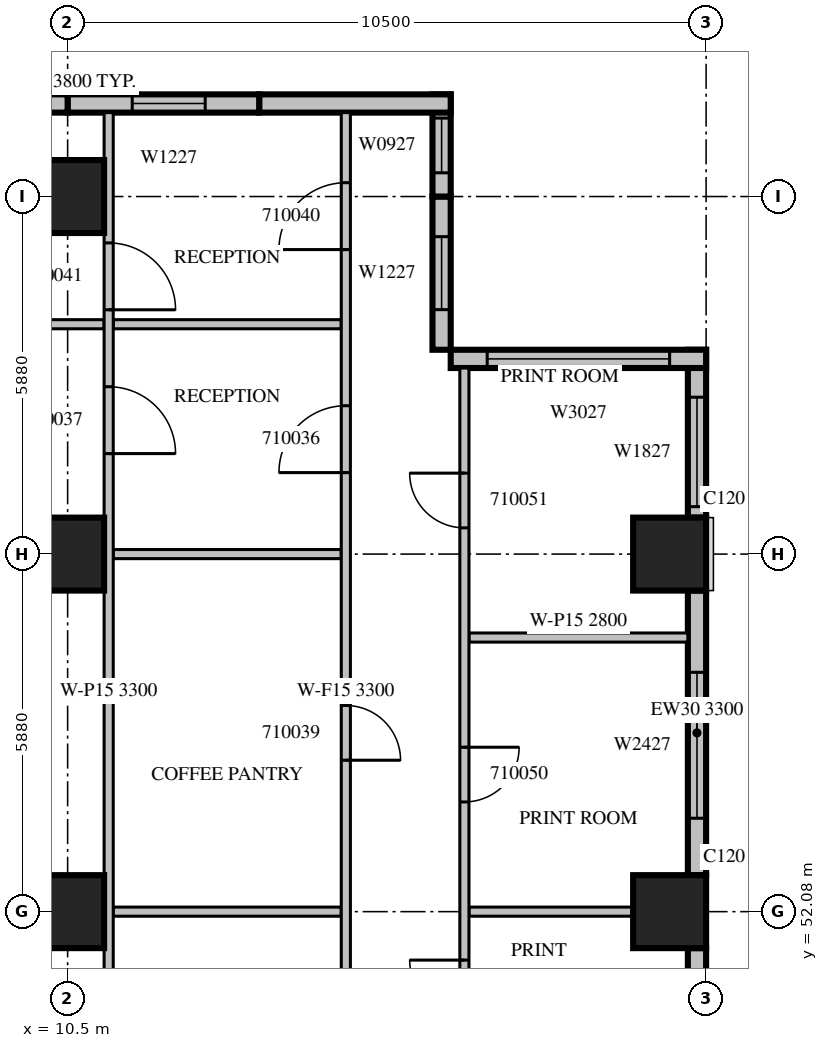
"""IFC4 building model, lengths in metres.
Left out: names, types, materials, properties, quantities, classifications, styles, units other than length and angle.
Written with IfcOpenShell. Run it as: python <this file> out.ifc"""

import sys

from ifc_helpers import new_model, si_unit, direction, frame, frame_2d, origin, origin_2d, place, context, subcontext, project, spatial, rectangle, extrude, source, transform, mapped, element, fill, save


model = new_model("IFC4")
c1 = context("Model", 3, precision=1e-05, world=origin(), true_north=direction((0.0, 1.0)))
c2 = subcontext(c1, "Body", "Model", "MODEL_VIEW")
j1 = project(units=[si_unit("LENGTHUNIT", "METRE"), si_unit("PLANEANGLEUNIT", "RADIAN")], contexts=[c1])
p1 = place(None, origin())
s1 = spatial("IfcSite", under=j1, at=p1, CompositionType="ELEMENT")
p2 = place(p1, origin())
s2 = spatial("IfcBuilding", under=s1, at=p2, CompositionType="ELEMENT")
p3 = place(p2, frame((0.0, 0.0, 53.1)))
s3 = spatial("IfcBuildingStorey", under=s2, at=p3, CompositionType="ELEMENT", Elevation=53.1)
m1 = source(origin(), c2, "Body", "SweptSolid", [
    extrude(rectangle(XDim=1.2, YDim=1.2, at=origin_2d()), origin(), (0.0, 0.0, 1.0), 4.2),
])
for number, where, z_axis, x_axis in (
    (1, (10.5, 52.08, 0.0), (0.0, 0.0, 1.0), (1.0, 0.0, 0.0)),
    (2, (20.4, 52.08, 0.0), (0.0, 0.0, 1.0), (1.0, 0.0, 0.0)),
    (3, (10.5, 57.96, 0.0), (0.0, 0.0, 1.0), (1.0, 0.0, 0.0)),
    (4, (20.4, 57.96, 0.0), (0.0, 0.0, 1.0), (1.0, 0.0, 0.0)),
    (5, (10.5, 63.84, 0.0), (0.0, 0.0, 1.0), (1.0, 0.0, 0.0)),
):
    element("IfcColumn", number, at=place(p3, frame(where, z_axis=z_axis, x_axis=x_axis)), inside=s3, PredefinedType="COLUMN", context=c2, shape_type="MappedRepresentation", body=[
        mapped(m1, transform((0.0, 0.0, 0.0), scale=1.0)),
    ])
m2 = source(origin(), c2, "Body", "SweptSolid", [
    extrude(rectangle(XDim=4.68, YDim=0.3, at=frame_2d((2.34, 0.0))), origin(), (0.0, 0.0, 1.0), 3.8),
])
p4 = place(p3, frame((20.85, 46.8, 0.0), z_axis=(0.0, 0.0, 1.0), x_axis=(0.0, 1.0, 0.0)))
e6 = element("IfcWall", 6, at=p4, inside=s3, PredefinedType="STANDARD", context=c2, shape_type="MappedRepresentation", body=[
    mapped(m2, transform((0.0, 0.0, 0.0), scale=1.0)),
])
m3 = source(origin(), c2, "Body", "SweptSolid", [
    extrude(rectangle(XDim=1.2, YDim=2.7, at=frame_2d((0.6, 1.35))), frame((0.0, 0.16, 0.0), z_axis=(0.0, -1.0, 0.0), x_axis=(1.0, 0.0, 0.0)), (0.0, 0.0, 1.0), 0.32),
])
p5 = place(p4, frame((0.976, 0.0, 0.6)))
e7 = element("IfcOpeningElement", 7, at=p5, cuts=e6, PredefinedType="OPENING", context=c2, shape_type="MappedRepresentation", body=[
    mapped(m3, transform((0.0, 0.0, 0.0), scale=1.0)),
])
m4 = source(origin(), c2, "Body", "SweptSolid", [
    extrude(rectangle(XDim=4.68, YDim=0.3, at=frame_2d((2.34, 0.0))), origin(), (0.0, 0.0, 1.0), 3.3),
])
p6 = place(p3, frame((20.85, 52.68, 0.0), z_axis=(0.0, 0.0, 1.0), x_axis=(0.0, 1.0, 0.0)))
e8 = element("IfcWall", 8, at=p6, inside=s3, PredefinedType="STANDARD", context=c2, shape_type="MappedRepresentation", body=[
    mapped(m4, transform((0.0, 0.0, 0.0), scale=1.0)),
])
m5 = source(origin(), c2, "Body", "SweptSolid", [
    extrude(rectangle(XDim=2.4, YDim=2.7, at=frame_2d((1.2, 1.35))), frame((0.0, 0.16, 0.0), z_axis=(0.0, -1.0, 0.0), x_axis=(1.0, 0.0, 0.0)), (0.0, 0.0, 1.0), 0.32),
])
p7 = place(p6, frame((0.936, 0.0, 0.6)))
e9 = element("IfcOpeningElement", 9, at=p7, cuts=e8, PredefinedType="OPENING", context=c2, shape_type="MappedRepresentation", body=[
    mapped(m5, transform((0.0, 0.0, 0.0), scale=1.0)),
])
m6 = source(origin(), c2, "Body", "SweptSolid", [
    extrude(rectangle(XDim=2.76, YDim=0.3, at=frame_2d((1.38, 0.0))), origin(), (0.0, 0.0, 1.0), 3.8),
])
p8 = place(p3, frame((20.85, 58.56, 0.0), z_axis=(0.0, 0.0, 1.0), x_axis=(0.0, 1.0, 0.0)))
e10 = element("IfcWall", 10, at=p8, inside=s3, PredefinedType="STANDARD", context=c2, shape_type="MappedRepresentation", body=[
    mapped(m6, transform((0.0, 0.0, 0.0), scale=1.0)),
])
m7 = source(origin(), c2, "Body", "SweptSolid", [
    extrude(rectangle(XDim=1.8, YDim=2.7, at=frame_2d((0.9, 1.35))), frame((0.0, 0.16, 0.0), z_axis=(0.0, -1.0, 0.0), x_axis=(1.0, 0.0, 0.0)), (0.0, 0.0, 1.0), 0.32),
])
p9 = place(p8, frame((0.18, 0.0, 0.6)))
e11 = element("IfcOpeningElement", 11, at=p9, cuts=e10, PredefinedType="OPENING", context=c2, shape_type="MappedRepresentation", body=[
    mapped(m7, transform((0.0, 0.0, 0.0), scale=1.0)),
])
m8 = source(origin(), c2, "Body", "SweptSolid", [
    extrude(rectangle(XDim=4.2, YDim=0.3, at=frame_2d((2.1, 0.0))), origin(), (0.0, 0.0, 1.0), 3.8),
])
p10 = place(p3, frame((21.0, 61.17, 0.0), z_axis=(0.0, 0.0, 1.0), x_axis=(-1.0, 0.0, 0.0)))
e12 = element("IfcWall", 12, at=p10, inside=s3, PredefinedType="STANDARD", context=c2, shape_type="MappedRepresentation", body=[
    mapped(m8, transform((0.0, 0.0, 0.0), scale=1.0)),
])
m9 = source(origin(), c2, "Body", "SweptSolid", [
    extrude(rectangle(XDim=3.0, YDim=2.7, at=frame_2d((1.5, 1.35))), frame((0.0, 0.16, 0.0), z_axis=(0.0, -1.0, 0.0), x_axis=(1.0, 0.0, 0.0)), (0.0, 0.0, 1.0), 0.32),
])
p11 = place(p10, frame((0.6, 0.0, 0.6)))
e13 = element("IfcOpeningElement", 13, at=p11, cuts=e12, PredefinedType="OPENING", context=c2, shape_type="MappedRepresentation", body=[
    mapped(m9, transform((0.0, 0.0, 0.0), scale=1.0)),
])
m10 = source(origin(), c2, "Body", "SweptSolid", [
    extrude(rectangle(XDim=2.52, YDim=0.3, at=frame_2d((1.26, 0.0))), origin(), (0.0, 0.0, 1.0), 3.8),
])
p12 = place(p3, frame((16.65, 61.32, 0.0), z_axis=(0.0, 0.0, 1.0), x_axis=(0.0, 1.0, 0.0)))
e14 = element("IfcWall", 14, at=p12, inside=s3, PredefinedType="STANDARD", context=c2, shape_type="MappedRepresentation", body=[
    mapped(m10, transform((0.0, 0.0, 0.0), scale=1.0)),
])
p13 = place(p12, frame((0.66, 0.0, 0.6)))
e15 = element("IfcOpeningElement", 15, at=p13, cuts=e14, PredefinedType="OPENING", context=c2, shape_type="MappedRepresentation", body=[
    mapped(m3, transform((0.0, 0.0, 0.0), scale=1.0)),
])
m11 = source(origin(), c2, "Body", "SweptSolid", [
    extrude(rectangle(XDim=1.68, YDim=0.3, at=frame_2d((0.84, 0.0))), origin(), (0.0, 0.0, 1.0), 3.8),
])
p14 = place(p3, frame((16.65, 63.84, 0.0), z_axis=(0.0, 0.0, 1.0), x_axis=(0.0, 1.0, 0.0)))
e16 = element("IfcWall", 16, at=p14, inside=s3, PredefinedType="STANDARD", context=c2, shape_type="MappedRepresentation", body=[
    mapped(m11, transform((0.0, 0.0, 0.0), scale=1.0)),
])
m12 = source(origin(), c2, "Body", "SweptSolid", [
    extrude(rectangle(XDim=0.9, YDim=2.7, at=frame_2d((0.45, 1.35))), frame((0.0, 0.16, 0.0), z_axis=(0.0, -1.0, 0.0), x_axis=(1.0, 0.0, 0.0)), (0.0, 0.0, 1.0), 0.32),
])
p15 = place(p14, frame((0.39, 0.0, 0.6)))
e17 = element("IfcOpeningElement", 17, at=p15, cuts=e16, PredefinedType="OPENING", context=c2, shape_type="MappedRepresentation", body=[
    mapped(m12, transform((0.0, 0.0, 0.0), scale=1.0)),
])
m13 = source(origin(), c2, "Body", "SweptSolid", [
    extrude(rectangle(XDim=3.15, YDim=0.3, at=frame_2d((1.575, 0.0))), origin(), (0.0, 0.0, 1.0), 3.8),
])
p16 = place(p3, frame((16.8, 65.37, 0.0), z_axis=(0.0, 0.0, 1.0), x_axis=(-1.0, 0.0, 0.0)))
e18 = element("IfcWall", 18, at=p16, inside=s3, PredefinedType="STANDARD", context=c2, shape_type="MappedRepresentation", body=[
    mapped(m13, transform((0.0, 0.0, 0.0), scale=1.0)),
])
p17 = place(p3, frame((13.65, 65.37, 0.0), z_axis=(0.0, 0.0, 1.0), x_axis=(-1.0, 0.0, 0.0)))
e19 = element("IfcWall", 19, at=p17, inside=s3, PredefinedType="STANDARD", context=c2, shape_type="MappedRepresentation", body=[
    mapped(m13, transform((0.0, 0.0, 0.0), scale=1.0)),
])
p18 = place(p17, frame((0.887, 0.0, 0.6)))
e20 = element("IfcOpeningElement", 20, at=p18, cuts=e19, PredefinedType="OPENING", context=c2, shape_type="MappedRepresentation", body=[
    mapped(m3, transform((0.0, 0.0, 0.0), scale=1.0)),
])
m14 = source(origin(), c2, "Body", "SweptSolid", [
    extrude(rectangle(XDim=6.3, YDim=0.3, at=frame_2d((3.15, 0.0))), origin(), (0.0, 0.0, 1.0), 3.8),
])
p19 = place(p3, frame((10.5, 65.37, 0.0), z_axis=(0.0, 0.0, 1.0), x_axis=(-1.0, 0.0, 0.0)))
e21 = element("IfcWall", 21, at=p19, inside=s3, PredefinedType="STANDARD", context=c2, shape_type="MappedRepresentation", body=[
    mapped(m14, transform((0.0, 0.0, 0.0), scale=1.0)),
])
p20 = place(p19, frame((0.675, 0.0, 0.6)))
e22 = element("IfcOpeningElement", 22, at=p20, cuts=e21, PredefinedType="OPENING", context=c2, shape_type="MappedRepresentation", body=[
    mapped(m7, transform((0.0, 0.0, 0.0), scale=1.0)),
])
p21 = place(p19, frame((3.825, 0.0, 0.6)))
e23 = element("IfcOpeningElement", 23, at=p21, cuts=e21, PredefinedType="OPENING", context=c2, shape_type="MappedRepresentation", body=[
    mapped(m7, transform((0.0, 0.0, 0.0), scale=1.0)),
])
m15 = source(origin(), c2, "Body", "SweptSolid", [
    extrude(rectangle(XDim=3.75, YDim=0.15, at=frame_2d((1.875, 0.0))), origin(), (0.0, 0.0, 1.0), 3.8),
])
for number, where, z_axis, x_axis in (
    (24, (15.0, 52.08, 0.0), (0.0, 0.0, 1.0), (-1.0, 0.0, 0.0)),
    (25, (15.0, 57.96, 0.0), (0.0, 0.0, 1.0), (-1.0, 0.0, 0.0)),
):
    element("IfcWall", number, at=place(p3, frame(where, z_axis=z_axis, x_axis=x_axis)), inside=s3, PredefinedType="PARTITIONING", context=c2, shape_type="MappedRepresentation", body=[
        mapped(m15, transform((0.0, 0.0, 0.0), scale=1.0)),
    ])
m16 = source(origin(), c2, "Body", "SweptSolid", [
    extrude(rectangle(XDim=6.695, YDim=0.15, at=frame_2d((3.348, 0.0))), origin(), (0.0, 0.0, 1.0), 3.8),
])
p22 = place(p3, frame((11.1, 61.74, 0.0), z_axis=(0.0, 0.0, 1.0), x_axis=(-1.0, 0.0, 0.0)))
e26 = element("IfcWall", 26, at=p22, inside=s3, PredefinedType="PARTITIONING", context=c2, shape_type="MappedRepresentation", body=[
    mapped(m16, transform((0.0, 0.0, 0.0), scale=1.0)),
])
p23 = place(p3, frame((15.0, 61.74, 0.0), z_axis=(0.0, 0.0, 1.0), x_axis=(-1.0, 0.0, 0.0)))
e27 = element("IfcWall", 27, at=p23, inside=s3, PredefinedType="PARTITIONING", context=c2, shape_type="MappedRepresentation", body=[
    mapped(m15, transform((0.0, 0.0, 0.0), scale=1.0)),
])
m17 = source(origin(), c2, "Body", "SweptSolid", [
    extrude(rectangle(XDim=19.02, YDim=0.15, at=frame_2d((9.51, 0.0))), origin(), (0.0, 0.0, 1.0), 3.3),
])
p24 = place(p3, frame((11.175, 46.2, 0.0), z_axis=(0.0, 0.0, 1.0), x_axis=(0.0, 1.0, 0.0)))
e28 = element("IfcWall", 28, at=p24, inside=s3, PredefinedType="PARTITIONING", context=c2, shape_type="MappedRepresentation", body=[
    mapped(m17, transform((0.0, 0.0, 0.0), scale=1.0)),
])
m18 = source(origin(), c2, "Body", "SweptSolid", [
    extrude(rectangle(XDim=1.1, YDim=2.1, at=frame_2d((0.55, 1.05))), frame((0.0, 0.085, 0.0), z_axis=(0.0, -1.0, 0.0), x_axis=(1.0, 0.0, 0.0)), (0.0, 0.0, 1.0), 0.17),
])
p25 = place(p24, frame((13.412, 0.0, 0.0)))
e29 = element("IfcOpeningElement", 29, at=p25, cuts=e28, PredefinedType="OPENING", context=c2, shape_type="MappedRepresentation", body=[
    mapped(m18, transform((0.0, 0.0, 0.0), scale=1.0)),
])
p26 = place(p24, frame((15.777, 0.0, 0.0)))
e30 = element("IfcOpeningElement", 30, at=p26, cuts=e28, PredefinedType="OPENING", context=c2, shape_type="MappedRepresentation", body=[
    mapped(m18, transform((0.0, 0.0, 0.0), scale=1.0)),
])
m19 = source(origin(), c2, "Body", "SweptSolid", [
    extrude(rectangle(XDim=3.6, YDim=0.15, at=frame_2d((1.8, 0.0))), origin(), (0.0, 0.0, 1.0), 2.8),
])
p27 = place(p3, frame((17.1, 56.587, 0.0), z_axis=(0.0, 0.0, 1.0), x_axis=(1.0, 0.0, 0.0)))
e31 = element("IfcWall", 31, at=p27, inside=s3, PredefinedType="PARTITIONING", context=c2, shape_type="MappedRepresentation", body=[
    mapped(m19, transform((0.0, 0.0, 0.0), scale=1.0)),
])
m20 = source(origin(), c2, "Body", "SweptSolid", [
    extrude(rectangle(XDim=2.701, YDim=0.15, at=frame_2d((1.351, 0.0))), origin(), (0.0, 0.0, 1.0), 3.8),
])
p28 = place(p3, frame((19.801, 52.08, 0.0), z_axis=(0.0, 0.0, 1.0), x_axis=(-1.0, 0.0, 0.0)))
e32 = element("IfcWall", 32, at=p28, inside=s3, PredefinedType="PARTITIONING", context=c2, shape_type="MappedRepresentation", body=[
    mapped(m20, transform((0.0, 0.0, 0.0), scale=1.0)),
])
p29 = place(p3, frame((15.075, 46.2, 0.0), z_axis=(0.0, 0.0, 1.0), x_axis=(0.0, 1.0, 0.0)))
e33 = element("IfcWall", 33, at=p29, inside=s3, PredefinedType="PARTITIONING", context=c2, shape_type="MappedRepresentation", body=[
    mapped(m17, transform((0.0, 0.0, 0.0), scale=1.0)),
])
p30 = place(p29, frame((13.1, 0.0, 0.0)))
e34 = element("IfcOpeningElement", 34, at=p30, cuts=e33, PredefinedType="OPENING", context=c2, shape_type="MappedRepresentation", body=[
    mapped(m18, transform((0.0, 0.0, 0.0), scale=1.0)),
])
m21 = source(origin(), c2, "Body", "SweptSolid", [
    extrude(rectangle(XDim=0.9, YDim=2.1, at=frame_2d((0.45, 1.05))), frame((0.0, 0.085, 0.0), z_axis=(0.0, -1.0, 0.0), x_axis=(1.0, 0.0, 0.0)), (0.0, 0.0, 1.0), 0.17),
])
p31 = place(p29, frame((2.49, 0.0, 0.0)))
e35 = element("IfcOpeningElement", 35, at=p31, cuts=e33, PredefinedType="OPENING", context=c2, shape_type="MappedRepresentation", body=[
    mapped(m21, transform((0.0, 0.0, 0.0), scale=1.0)),
])
p32 = place(p29, frame((8.37, 0.0, 0.0)))
e36 = element("IfcOpeningElement", 36, at=p32, cuts=e33, PredefinedType="OPENING", context=c2, shape_type="MappedRepresentation", body=[
    mapped(m21, transform((0.0, 0.0, 0.0), scale=1.0)),
])
p33 = place(p29, frame((16.767, 0.0, 0.0)))
e37 = element("IfcOpeningElement", 37, at=p33, cuts=e33, PredefinedType="OPENING", context=c2, shape_type="MappedRepresentation", body=[
    mapped(m18, transform((0.0, 0.0, 0.0), scale=1.0)),
])
m22 = source(origin(), c2, "Body", "SweptSolid", [
    extrude(rectangle(XDim=31.62, YDim=0.15, at=frame_2d((15.81, 0.0))), origin(), (0.0, 0.0, 1.0), 3.3),
])
p34 = place(p3, frame((17.025, 61.02, 0.0), z_axis=(0.0, 0.0, 1.0), x_axis=(0.0, -1.0, 0.0)))
e38 = element("IfcWall", 38, at=p34, inside=s3, PredefinedType="PARTITIONING", context=c2, shape_type="MappedRepresentation", body=[
    mapped(m22, transform((0.0, 0.0, 0.0), scale=1.0)),
])
m23 = source(origin(), c2, "Body", "SweptSolid", [
    extrude(rectangle(XDim=1.0, YDim=2.1, at=frame_2d((0.5, 1.05))), frame((0.0, 0.085, 0.0), z_axis=(0.0, -1.0, 0.0), x_axis=(1.0, 0.0, 0.0)), (0.0, 0.0, 1.0), 0.17),
])
p35 = place(p34, frame((29.263, 0.0, 0.0)))
e39 = element("IfcOpeningElement", 39, at=p35, cuts=e38, PredefinedType="OPENING", context=c2, shape_type="MappedRepresentation", body=[
    mapped(m23, transform((0.0, 0.0, 0.0), scale=1.0)),
])
p36 = place(p34, frame((25.951, 0.0, 0.0)))
e40 = element("IfcOpeningElement", 40, at=p36, cuts=e38, PredefinedType="OPENING", context=c2, shape_type="MappedRepresentation", body=[
    mapped(m23, transform((0.0, 0.0, 0.0), scale=1.0)),
])
p37 = place(p34, frame((23.608, 0.0, 0.0)))
e41 = element("IfcOpeningElement", 41, at=p37, cuts=e38, PredefinedType="OPENING", context=c2, shape_type="MappedRepresentation", body=[
    mapped(m23, transform((0.0, 0.0, 0.0), scale=1.0)),
])
p38 = place(p34, frame((20.863, 0.0, 0.0)))
e42 = element("IfcOpeningElement", 42, at=p38, cuts=e38, PredefinedType="OPENING", context=c2, shape_type="MappedRepresentation", body=[
    mapped(m23, transform((0.0, 0.0, 0.0), scale=1.0)),
])
p39 = place(p34, frame((17.551, 0.0, 0.0)))
e43 = element("IfcOpeningElement", 43, at=p39, cuts=e38, PredefinedType="OPENING", context=c2, shape_type="MappedRepresentation", body=[
    mapped(m23, transform((0.0, 0.0, 0.0), scale=1.0)),
])
p40 = place(p34, frame((15.208, 0.0, 0.0)))
e44 = element("IfcOpeningElement", 44, at=p40, cuts=e38, PredefinedType="OPENING", context=c2, shape_type="MappedRepresentation", body=[
    mapped(m23, transform((0.0, 0.0, 0.0), scale=1.0)),
])
p41 = place(p34, frame((12.677, 0.0, 0.0)))
e45 = element("IfcOpeningElement", 45, at=p41, cuts=e38, PredefinedType="OPENING", context=c2, shape_type="MappedRepresentation", body=[
    mapped(m21, transform((0.0, 0.0, 0.0), scale=1.0)),
])
p42 = place(p34, frame((9.737, 0.0, 0.0)))
e46 = element("IfcOpeningElement", 46, at=p42, cuts=e38, PredefinedType="OPENING", context=c2, shape_type="MappedRepresentation", body=[
    mapped(m21, transform((0.0, 0.0, 0.0), scale=1.0)),
])
p43 = place(p34, frame((6.236, 0.0, 0.0)))
e47 = element("IfcOpeningElement", 47, at=p43, cuts=e38, PredefinedType="OPENING", context=c2, shape_type="MappedRepresentation", body=[
    mapped(m21, transform((0.0, 0.0, 0.0), scale=1.0)),
])
p44 = place(p34, frame((1.729, 0.0, 0.0)))
e48 = element("IfcOpeningElement", 48, at=p44, cuts=e38, PredefinedType="OPENING", context=c2, shape_type="MappedRepresentation", body=[
    mapped(m21, transform((0.0, 0.0, 0.0), scale=1.0)),
])
m24 = source(origin(), c2, "Body", "SweptSolid", [
    extrude(rectangle(XDim=2.4, YDim=2.7, at=frame_2d((1.2, 1.35))), frame((0.0, 0.03, 0.0), z_axis=(0.0, -1.0, 0.0), x_axis=(1.0, 0.0, 0.0)), (0.0, 0.0, 1.0), 0.06),
])
p45 = place(p7, origin())
e49 = element("IfcWindow", 49, at=p45, inside=s3, PartitioningType="SINGLE_PANEL", PredefinedType="WINDOW", context=c2, shape_type="MappedRepresentation", body=[
    mapped(m24, transform((0.0, 0.0, 0.0), scale=1.0)),
])
fill(e9, e49)
m25 = source(origin(), c2, "Body", "SweptSolid", [
    extrude(rectangle(XDim=1.8, YDim=2.7, at=frame_2d((0.9, 1.35))), frame((0.0, 0.03, 0.0), z_axis=(0.0, -1.0, 0.0), x_axis=(1.0, 0.0, 0.0)), (0.0, 0.0, 1.0), 0.06),
])
p46 = place(p9, origin())
e50 = element("IfcWindow", 50, at=p46, inside=s3, PartitioningType="SINGLE_PANEL", PredefinedType="WINDOW", context=c2, shape_type="MappedRepresentation", body=[
    mapped(m25, transform((0.0, 0.0, 0.0), scale=1.0)),
])
fill(e11, e50)
m26 = source(origin(), c2, "Body", "SweptSolid", [
    extrude(rectangle(XDim=3.0, YDim=2.7, at=frame_2d((1.5, 1.35))), frame((0.0, 0.03, 0.0), z_axis=(0.0, -1.0, 0.0), x_axis=(1.0, 0.0, 0.0)), (0.0, 0.0, 1.0), 0.06),
])
p47 = place(p11, origin())
e51 = element("IfcWindow", 51, at=p47, inside=s3, PartitioningType="SINGLE_PANEL", PredefinedType="WINDOW", context=c2, shape_type="MappedRepresentation", body=[
    mapped(m26, transform((0.0, 0.0, 0.0), scale=1.0)),
])
fill(e13, e51)
m27 = source(origin(), c2, "Body", "SweptSolid", [
    extrude(rectangle(XDim=1.2, YDim=2.7, at=frame_2d((0.6, 1.35))), frame((0.0, 0.03, 0.0), z_axis=(0.0, -1.0, 0.0), x_axis=(1.0, 0.0, 0.0)), (0.0, 0.0, 1.0), 0.06),
])
p48 = place(p13, origin())
e52 = element("IfcWindow", 52, at=p48, inside=s3, PartitioningType="SINGLE_PANEL", PredefinedType="WINDOW", context=c2, shape_type="MappedRepresentation", body=[
    mapped(m27, transform((0.0, 0.0, 0.0), scale=1.0)),
])
fill(e15, e52)
m28 = source(origin(), c2, "Body", "SweptSolid", [
    extrude(rectangle(XDim=0.9, YDim=2.7, at=frame_2d((0.45, 1.35))), frame((0.0, 0.03, 0.0), z_axis=(0.0, -1.0, 0.0), x_axis=(1.0, 0.0, 0.0)), (0.0, 0.0, 1.0), 0.06),
])
p49 = place(p15, origin())
e53 = element("IfcWindow", 53, at=p49, inside=s3, PartitioningType="SINGLE_PANEL", PredefinedType="WINDOW", context=c2, shape_type="MappedRepresentation", body=[
    mapped(m28, transform((0.0, 0.0, 0.0), scale=1.0)),
])
fill(e17, e53)
p50 = place(p18, origin())
e54 = element("IfcWindow", 54, at=p50, inside=s3, PartitioningType="SINGLE_PANEL", PredefinedType="WINDOW", context=c2, shape_type="MappedRepresentation", body=[
    mapped(m27, transform((0.0, 0.0, 0.0), scale=1.0)),
])
fill(e20, e54)
m29 = source(origin(), c2, "Body", "SweptSolid", [
    extrude(rectangle(XDim=1.1, YDim=2.1, at=frame_2d((0.55, 1.05))), frame((0.0, 0.025, 0.0), z_axis=(0.0, -1.0, 0.0), x_axis=(1.0, 0.0, 0.0)), (0.0, 0.0, 1.0), 0.05),
])
p51 = place(p30, origin())
e55 = element("IfcDoor", 55, at=p51, inside=s3, OperationType="SINGLE_SWING_LEFT", PredefinedType="DOOR", context=c2, shape_type="MappedRepresentation", body=[
    mapped(m29, transform((0.0, 0.0, 0.0), scale=1.0)),
])
fill(e34, e55)
p52 = place(p25, origin())
e56 = element("IfcDoor", 56, at=p52, inside=s3, OperationType="SINGLE_SWING_RIGHT", PredefinedType="DOOR", context=c2, shape_type="MappedRepresentation", body=[
    mapped(m29, transform((0.0, 0.0, 0.0), scale=1.0)),
])
fill(e29, e56)
m30 = source(origin(), c2, "Body", "SweptSolid", [
    extrude(rectangle(XDim=0.9, YDim=2.1, at=frame_2d((0.45, 1.05))), frame((0.0, 0.025, 0.0), z_axis=(0.0, -1.0, 0.0), x_axis=(1.0, 0.0, 0.0)), (0.0, 0.0, 1.0), 0.05),
])
p53 = place(p32, origin())
e57 = element("IfcDoor", 57, at=p53, inside=s3, OperationType="SINGLE_SWING_RIGHT", PredefinedType="DOOR", context=c2, shape_type="MappedRepresentation", body=[
    mapped(m30, transform((0.0, 0.0, 0.0), scale=1.0)),
])
fill(e36, e57)
p54 = place(p33, origin())
e58 = element("IfcDoor", 58, at=p54, inside=s3, OperationType="SINGLE_SWING_LEFT", PredefinedType="DOOR", context=c2, shape_type="MappedRepresentation", body=[
    mapped(m29, transform((0.0, 0.0, 0.0), scale=1.0)),
])
fill(e37, e58)
p55 = place(p26, origin())
e59 = element("IfcDoor", 59, at=p55, inside=s3, OperationType="SINGLE_SWING_RIGHT", PredefinedType="DOOR", context=c2, shape_type="MappedRepresentation", body=[
    mapped(m29, transform((0.0, 0.0, 0.0), scale=1.0)),
])
fill(e30, e59)
p56 = place(p42, origin())
e60 = element("IfcDoor", 60, at=p56, inside=s3, OperationType="SINGLE_SWING_RIGHT", PredefinedType="DOOR", context=c2, shape_type="MappedRepresentation", body=[
    mapped(m30, transform((0.0, 0.0, 0.0), scale=1.0)),
])
fill(e46, e60)
p57 = place(p43, origin())
e61 = element("IfcDoor", 61, at=p57, inside=s3, OperationType="SINGLE_SWING_LEFT", PredefinedType="DOOR", context=c2, shape_type="MappedRepresentation", body=[
    mapped(m30, transform((0.0, 0.0, 0.0), scale=1.0)),
])
fill(e47, e61)
p58 = place(p44, origin())
e62 = element("IfcDoor", 62, at=p58, inside=s3, OperationType="SINGLE_SWING_RIGHT", PredefinedType="DOOR", context=c2, shape_type="MappedRepresentation", body=[
    mapped(m30, transform((0.0, 0.0, 0.0), scale=1.0)),
])
fill(e48, e62)
save(model, sys.argv[1])
